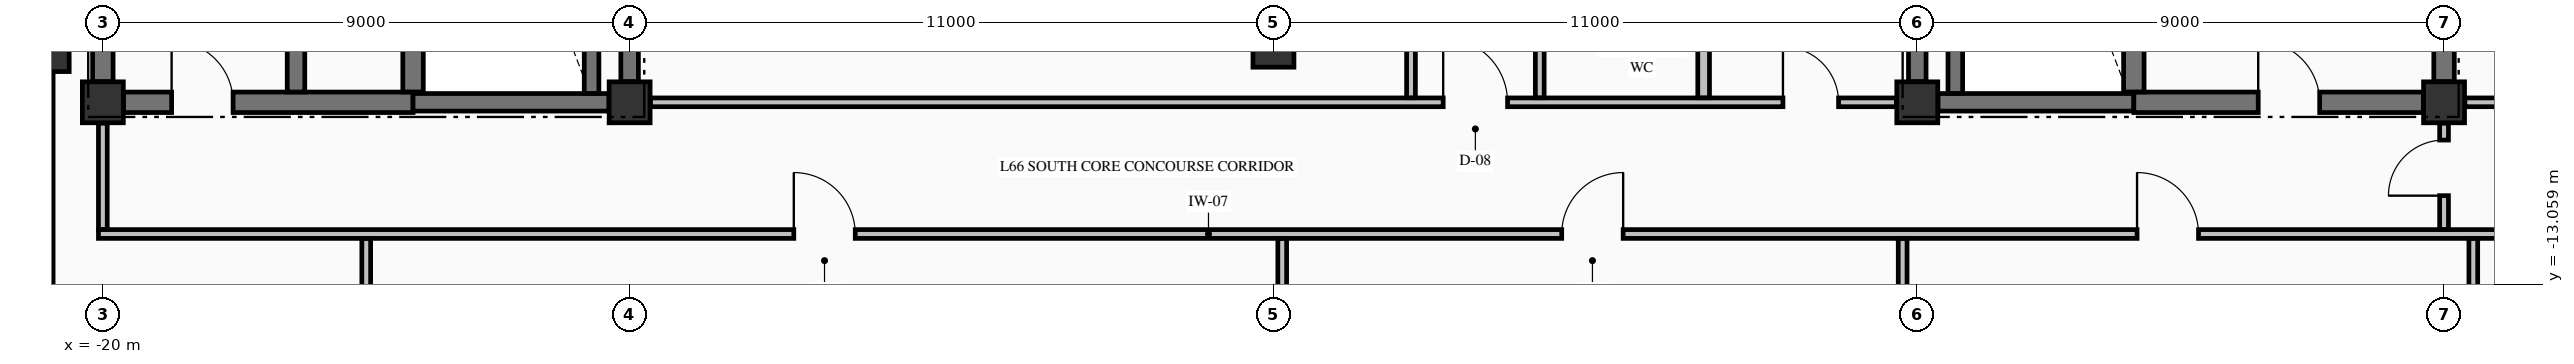
"""IFC4 building model, lengths in metres.
Left out: names, types, materials, properties, quantities, classifications, styles, units other than length and angle.
Written with IfcOpenShell. Run it as: python <this file> out.ifc"""

import sys

from ifc_helpers import new_model, si_unit, direction, frame, frame_2d, origin, origin_2d, place, context, subcontext, project, spatial, rectangle, extrude, element, fill, save


model = new_model("IFC4")
c1 = context("Model", 3, precision=1e-05, world=origin(), true_north=direction((0.0, 1.0)))
c2 = subcontext(c1, "Body", "Model", "MODEL_VIEW")
j1 = project(units=[si_unit("LENGTHUNIT", "METRE"), si_unit("PLANEANGLEUNIT", "RADIAN")], contexts=[c1])
p1 = place(None, origin())
s1 = spatial("IfcSite", under=j1, at=p1, CompositionType="ELEMENT")
p2 = place(p1, origin())
s2 = spatial("IfcBuilding", under=s1, at=p2, CompositionType="ELEMENT")
p3 = place(p2, frame((0.0, 0.0, 249.43)))
s3 = spatial("IfcBuildingStorey", under=s2, at=p3, CompositionType="ELEMENT", Elevation=249.43)
p4 = place(p3, frame((-21.0, -9.0, -0.425), z_axis=(0.0, 0.0, 1.0), x_axis=(1.0, 0.0, 0.0)))
e1 = element("IfcColumn", 1, at=p4, inside=s3, PredefinedType="COLUMN", context=c2, shape_type="SweptSolid", body=[
    extrude(rectangle(XDim=0.85, YDim=0.85, at=origin_2d()), origin(), (0.0, 0.0, 1.0), 5.0),
])
for number, where, z_axis, x_axis in (
    (2, (-20.0, -9.95, -0.425), (0.0, 0.0, 1.0), (1.0, 0.0, 0.0)),
    (3, (-11.0, -9.95, -0.425), (0.0, 0.0, 1.0), (1.0, 0.0, 0.0)),
    (4, (11.0, -9.95, -0.425), (0.0, 0.0, 1.0), (1.0, 0.0, 0.0)),
    (5, (20.0, -9.95, -0.425), (0.0, 0.0, 1.0), (1.0, 0.0, 0.0)),
    (6, (0.0, -9.0, -0.425), (0.0, 0.0, 1.0), (1.0, 0.0, 0.0)),
):
    element("IfcColumn", number, at=place(p3, frame(where, z_axis=z_axis, x_axis=x_axis)), inside=s3, PredefinedType="COLUMN", context=c2, shape_type="SweptSolid", body=[
        extrude(rectangle(XDim=0.7, YDim=0.7, at=origin_2d()), origin(), (0.0, 0.0, 1.0), 5.0),
    ])
p5 = place(p3, frame((-21.0, -9.455, 0.0), z_axis=(0.0, 0.0, 1.0), x_axis=(0.0, -1.0, 0.0)))
e7 = element("IfcWall", 7, at=p5, inside=s3, PredefinedType="STANDARD", context=c2, shape_type="SweptSolid", body=[
    extrude(rectangle(XDim=8.09, YDim=0.3, at=frame_2d((4.045, 0.0))), origin(), (0.0, 0.0, 1.0), 2.167),
])
p6 = place(p3, frame((-19.646, -9.95, 0.0), z_axis=(0.0, 0.0, 1.0), x_axis=(1.0, 0.0, 0.0)))
e8 = element("IfcWall", 8, at=p6, inside=s3, PredefinedType="SHEAR", context=c2, shape_type="SweptSolid", body=[
    extrude(rectangle(XDim=4.946, YDim=0.35, at=frame_2d((2.473, 0.0))), origin(), (0.0, 0.0, 1.0), 4.575),
])
p7 = place(p6, frame((0.821, 0.0, 0.0)))
e9 = element("IfcOpeningElement", 9, at=p7, cuts=e8, PredefinedType="OPENING", context=c2, shape_type="SweptSolid", body=[
    extrude(rectangle(XDim=1.05, YDim=2.15, at=frame_2d((0.525, 1.075))), frame((0.0, 0.185, 0.0), z_axis=(0.0, -1.0, 0.0), x_axis=(1.0, 0.0, 0.0)), (0.0, 0.0, 1.0), 0.37),
])
for number, where, z_axis, x_axis in (
    (10, (-14.7, -9.95, 0.0), (0.0, 0.0, 1.0), (1.0, 0.0, 0.0)),
    (11, (11.354, -9.95, 0.0), (0.0, 0.0, 1.0), (1.0, 0.0, 0.0)),
):
    element("IfcWall", number, at=place(p3, frame(where, z_axis=z_axis, x_axis=x_axis)), inside=s3, PredefinedType="SHEAR", context=c2, shape_type="SweptSolid", body=[
        extrude(rectangle(XDim=3.346, YDim=0.3, at=frame_2d((1.673, 0.0))), origin(), (0.0, 0.0, 1.0), 4.575),
    ])
p8 = place(p3, frame((14.7, -9.95, 0.0), z_axis=(0.0, 0.0, 1.0), x_axis=(1.0, 0.0, 0.0)))
e12 = element("IfcWall", 12, at=p8, inside=s3, PredefinedType="SHEAR", context=c2, shape_type="SweptSolid", body=[
    extrude(rectangle(XDim=4.946, YDim=0.35, at=frame_2d((2.473, 0.0))), origin(), (0.0, 0.0, 1.0), 4.575),
])
p9 = place(p8, frame((2.125, 0.0, 0.0)))
e13 = element("IfcOpeningElement", 13, at=p9, cuts=e12, PredefinedType="OPENING", context=c2, shape_type="SweptSolid", body=[
    extrude(rectangle(XDim=1.05, YDim=2.15, at=frame_2d((0.525, 1.075))), frame((0.0, 0.185, 0.0), z_axis=(0.0, -1.0, 0.0), x_axis=(1.0, 0.0, 0.0)), (0.0, 0.0, 1.0), 0.37),
])
p10 = place(p3, frame((-20.075, -12.2, 0.0), z_axis=(0.0, 0.0, 1.0), x_axis=(1.0, 0.0, 0.0)))
e14 = element("IfcWall", 14, at=p10, inside=s3, PredefinedType="PARTITIONING", context=c2, shape_type="SweptSolid", body=[
    extrude(rectangle(XDim=45.91, YDim=0.15, at=frame_2d((22.955, 0.0))), origin(), (0.0, 0.0, 1.0), 4.575),
])
p11 = place(p10, frame((11.88, 0.0, 0.0)))
e15 = element("IfcOpeningElement", 15, at=p11, cuts=e14, PredefinedType="OPENING", context=c2, shape_type="SweptSolid", body=[
    extrude(rectangle(XDim=1.05, YDim=2.15, at=frame_2d((0.525, 1.075))), frame((0.0, 0.085, 0.0), z_axis=(0.0, -1.0, 0.0), x_axis=(1.0, 0.0, 0.0)), (0.0, 0.0, 1.0), 0.17),
])
p12 = place(p10, frame((25.0, 0.0, 0.0)))
e16 = element("IfcOpeningElement", 16, at=p12, cuts=e14, PredefinedType="OPENING", context=c2, shape_type="SweptSolid", body=[
    extrude(rectangle(XDim=1.05, YDim=2.15, at=frame_2d((0.525, 1.075))), frame((0.0, 0.085, 0.0), z_axis=(0.0, -1.0, 0.0), x_axis=(1.0, 0.0, 0.0)), (0.0, 0.0, 1.0), 0.17),
])
p13 = place(p10, frame((34.83, 0.0, 0.0)))
e17 = element("IfcOpeningElement", 17, at=p13, cuts=e14, PredefinedType="OPENING", context=c2, shape_type="SweptSolid", body=[
    extrude(rectangle(XDim=1.05, YDim=2.15, at=frame_2d((0.525, 1.075))), frame((0.0, 0.085, 0.0), z_axis=(0.0, -1.0, 0.0), x_axis=(1.0, 0.0, 0.0)), (0.0, 0.0, 1.0), 0.17),
])
p14 = place(p3, frame((-10.644, -9.95, 0.0), z_axis=(0.0, 0.0, 1.0), x_axis=(1.0, 0.0, 0.0)))
e18 = element("IfcWall", 18, at=p14, inside=s3, PredefinedType="PARTITIONING", context=c2, shape_type="SweptSolid", body=[
    extrude(rectangle(XDim=21.288, YDim=0.15, at=frame_2d((10.644, 0.0))), origin(), (0.0, 0.0, 1.0), 4.575),
])
p15 = place(p14, frame((13.544, 0.0, 0.0)))
e19 = element("IfcOpeningElement", 19, at=p15, cuts=e18, PredefinedType="OPENING", context=c2, shape_type="SweptSolid", body=[
    extrude(rectangle(XDim=1.1, YDim=2.15, at=frame_2d((0.55, 1.075))), frame((0.0, 0.085, 0.0), z_axis=(0.0, -1.0, 0.0), x_axis=(1.0, 0.0, 0.0)), (0.0, 0.0, 1.0), 0.17),
])
p16 = place(p14, frame((19.349, 0.0, 0.0)))
e20 = element("IfcOpeningElement", 20, at=p16, cuts=e18, PredefinedType="OPENING", context=c2, shape_type="SweptSolid", body=[
    extrude(rectangle(XDim=0.95, YDim=2.15, at=frame_2d((0.475, 1.075))), frame((0.0, 0.085, 0.0), z_axis=(0.0, -1.0, 0.0), x_axis=(1.0, 0.0, 0.0)), (0.0, 0.0, 1.0), 0.17),
])
p17 = place(p3, frame((20.356, -9.95, 0.0), z_axis=(0.0, 0.0, 1.0), x_axis=(1.0, 0.0, 0.0)))
e21 = element("IfcWall", 21, at=p17, inside=s3, PredefinedType="PARTITIONING", context=c2, shape_type="SweptSolid", body=[
    extrude(rectangle(XDim=5.479, YDim=0.15, at=frame_2d((2.74, 0.0))), origin(), (0.0, 0.0, 1.0), 4.575),
])
p18 = place(p17, frame((2.144, 0.0, 0.0)))
e22 = element("IfcOpeningElement", 22, at=p18, cuts=e21, PredefinedType="OPENING", context=c2, shape_type="SweptSolid", body=[
    extrude(rectangle(XDim=1.0, YDim=2.15, at=frame_2d((0.5, 1.075))), frame((0.0, 0.085, 0.0), z_axis=(0.0, -1.0, 0.0), x_axis=(1.0, 0.0, 0.0)), (0.0, 0.0, 1.0), 0.17),
])
p19 = place(p3, frame((-20.0, -9.596, 0.0), z_axis=(0.0, 0.0, 1.0), x_axis=(0.0, 1.0, 0.0)))
e23 = element("IfcWall", 23, at=p19, inside=s3, PredefinedType="SHEAR", context=c2, shape_type="SweptSolid", body=[
    extrude(rectangle(XDim=9.194, YDim=0.35, at=frame_2d((4.597, 0.0))), origin(), (0.0, 0.0, 1.0), 4.575),
])
p20 = place(p3, frame((-16.7, -9.773, 0.0), z_axis=(0.0, 0.0, 1.0), x_axis=(0.0, 1.0, 0.0)))
e24 = element("IfcWall", 24, at=p20, inside=s3, PredefinedType="SHEAR", context=c2, shape_type="SweptSolid", body=[
    extrude(rectangle(XDim=9.371, YDim=0.3, at=frame_2d((4.686, 0.0))), origin(), (0.0, 0.0, 1.0), 4.575),
])
p21 = place(p3, frame((-14.7, -9.773, 0.0), z_axis=(0.0, 0.0, 1.0), x_axis=(0.0, 1.0, 0.0)))
e25 = element("IfcWall", 25, at=p21, inside=s3, PredefinedType="SHEAR", context=c2, shape_type="SweptSolid", body=[
    extrude(rectangle(XDim=9.371, YDim=0.35, at=frame_2d((4.686, 0.0))), origin(), (0.0, 0.0, 1.0), 4.575),
])
p22 = place(p3, frame((-11.65, -9.798, 0.0), z_axis=(0.0, 0.0, 1.0), x_axis=(0.0, 1.0, 0.0)))
e26 = element("IfcWall", 26, at=p22, inside=s3, PredefinedType="SOLIDWALL", context=c2, shape_type="SweptSolid", body=[
    extrude(rectangle(XDim=9.396, YDim=0.25, at=frame_2d((4.698, 0.0))), origin(), (0.0, 0.0, 1.0), 4.575),
])
for number, where, z_axis, x_axis in (
    (27, (-11.0, -9.596, 0.0), (0.0, 0.0, 1.0), (0.0, 1.0, 0.0)),
    (28, (11.0, -9.596, 0.0), (0.0, 0.0, 1.0), (0.0, 1.0, 0.0)),
):
    element("IfcWall", number, at=place(p3, frame(where, z_axis=z_axis, x_axis=x_axis)), inside=s3, PredefinedType="SHEAR", context=c2, shape_type="SweptSolid", body=[
        extrude(rectangle(XDim=9.242, YDim=0.3, at=frame_2d((4.621, 0.0))), origin(), (0.0, 0.0, 1.0), 4.575),
    ])
p23 = place(p3, frame((11.65, -9.798, 0.0), z_axis=(0.0, 0.0, 1.0), x_axis=(0.0, 1.0, 0.0)))
e29 = element("IfcWall", 29, at=p23, inside=s3, PredefinedType="SOLIDWALL", context=c2, shape_type="SweptSolid", body=[
    extrude(rectangle(XDim=9.396, YDim=0.25, at=frame_2d((4.698, 0.0))), origin(), (0.0, 0.0, 1.0), 4.575),
])
p24 = place(p3, frame((14.7, -9.773, 0.0), z_axis=(0.0, 0.0, 1.0), x_axis=(0.0, 1.0, 0.0)))
e30 = element("IfcWall", 30, at=p24, inside=s3, PredefinedType="SHEAR", context=c2, shape_type="SweptSolid", body=[
    extrude(rectangle(XDim=9.371, YDim=0.35, at=frame_2d((4.686, 0.0))), origin(), (0.0, 0.0, 1.0), 4.575),
])
p25 = place(p3, frame((20.0, -9.596, 0.0), z_axis=(0.0, 0.0, 1.0), x_axis=(0.0, 1.0, 0.0)))
e31 = element("IfcWall", 31, at=p25, inside=s3, PredefinedType="SHEAR", context=c2, shape_type="SweptSolid", body=[
    extrude(rectangle(XDim=9.242, YDim=0.35, at=frame_2d((4.621, 0.0))), origin(), (0.0, 0.0, 1.0), 4.575),
])
p26 = place(p3, frame((-20.0, -12.122, 0.0), z_axis=(0.0, 0.0, 1.0), x_axis=(0.0, 1.0, 0.0)))
e32 = element("IfcWall", 32, at=p26, inside=s3, PredefinedType="PARTITIONING", context=c2, shape_type="SweptSolid", body=[
    extrude(rectangle(XDim=1.816, YDim=0.15, at=frame_2d((0.908, 0.0))), origin(), (0.0, 0.0, 1.0), 4.165),
])
p27 = place(p3, frame((-15.5, -17.569, 0.0), z_axis=(0.0, 0.0, 1.0), x_axis=(0.0, 1.0, 0.0)))
e33 = element("IfcWall", 33, at=p27, inside=s3, PredefinedType="PARTITIONING", context=c2, shape_type="SweptSolid", body=[
    extrude(rectangle(XDim=5.291, YDim=0.15, at=frame_2d((2.646, 0.0))), origin(), (0.0, 0.0, 1.0), 4.575),
])
p28 = place(p3, frame((0.15, -23.069, 0.0), z_axis=(0.0, 0.0, 1.0), x_axis=(0.0, 1.0, 0.0)))
e34 = element("IfcWall", 34, at=p28, inside=s3, PredefinedType="PARTITIONING", context=c2, shape_type="SweptSolid", body=[
    extrude(rectangle(XDim=10.791, YDim=0.15, at=frame_2d((5.396, 0.0))), origin(), (0.0, 0.0, 1.0), 2.167),
])
p29 = place(p3, frame((2.35, -9.872, 0.0), z_axis=(0.0, 0.0, 1.0), x_axis=(0.0, 1.0, 0.0)))
e35 = element("IfcWall", 35, at=p29, inside=s3, PredefinedType="PARTITIONING", context=c2, shape_type="SweptSolid", body=[
    extrude(rectangle(XDim=9.544, YDim=0.15, at=frame_2d((4.772, 0.0))), origin(), (0.0, 0.0, 1.0), 4.575),
])
p30 = place(p3, frame((4.55, -9.872, 0.0), z_axis=(0.0, 0.0, 1.0), x_axis=(0.0, 1.0, 0.0)))
e36 = element("IfcWall", 36, at=p30, inside=s3, PredefinedType="PARTITIONING", context=c2, shape_type="SweptSolid", body=[
    extrude(rectangle(XDim=4.919, YDim=0.15, at=frame_2d((2.459, 0.0))), origin(), (0.0, 0.0, 1.0), 4.575),
])
p31 = place(p30, frame((1.997, 0.0, 0.0)))
e37 = element("IfcOpeningElement", 37, at=p31, cuts=e36, PredefinedType="OPENING", context=c2, shape_type="SweptSolid", body=[
    extrude(rectangle(XDim=0.95, YDim=2.15, at=frame_2d((0.475, 1.075))), frame((0.0, 0.085, 0.0), z_axis=(0.0, -1.0, 0.0), x_axis=(1.0, 0.0, 0.0)), (0.0, 0.0, 1.0), 0.17),
])
p32 = place(p3, frame((7.35, -9.872, 0.0), z_axis=(0.0, 0.0, 1.0), x_axis=(0.0, 1.0, 0.0)))
e38 = element("IfcWall", 38, at=p32, inside=s3, PredefinedType="PARTITIONING", context=c2, shape_type="SweptSolid", body=[
    extrude(rectangle(XDim=4.919, YDim=0.2, at=frame_2d((2.459, 0.0))), origin(), (0.0, 0.0, 1.0), 4.575),
])
p33 = place(p3, frame((10.75, -23.069, 0.0), z_axis=(0.0, 0.0, 1.0), x_axis=(0.0, 1.0, 0.0)))
e39 = element("IfcWall", 39, at=p33, inside=s3, PredefinedType="PARTITIONING", context=c2, shape_type="SweptSolid", body=[
    extrude(rectangle(XDim=10.791, YDim=0.15, at=frame_2d((5.396, 0.0))), origin(), (0.0, 0.0, 1.0), 2.167),
])
p34 = place(p3, frame((20.0, -12.122, 0.0), z_axis=(0.0, 0.0, 1.0), x_axis=(0.0, 1.0, 0.0)))
e40 = element("IfcWall", 40, at=p34, inside=s3, PredefinedType="PARTITIONING", context=c2, shape_type="SweptSolid", body=[
    extrude(rectangle(XDim=1.816, YDim=0.15, at=frame_2d((0.908, 0.0))), origin(), (0.0, 0.0, 1.0), 4.575),
])
p35 = place(p34, frame((0.577, 0.0, 0.0)))
e41 = element("IfcOpeningElement", 41, at=p35, cuts=e40, PredefinedType="OPENING", context=c2, shape_type="SweptSolid", body=[
    extrude(rectangle(XDim=0.95, YDim=2.02, at=frame_2d((0.475, 1.01))), frame((0.0, 0.085, 0.0), z_axis=(0.0, -1.0, 0.0), x_axis=(1.0, 0.0, 0.0)), (0.0, 0.0, 1.0), 0.17),
])
p36 = place(p3, frame((20.5, -17.569, 0.0), z_axis=(0.0, 0.0, 1.0), x_axis=(0.0, 1.0, 0.0)))
e42 = element("IfcWall", 42, at=p36, inside=s3, PredefinedType="PARTITIONING", context=c2, shape_type="SweptSolid", body=[
    extrude(rectangle(XDim=5.291, YDim=0.15, at=frame_2d((2.646, 0.0))), origin(), (0.0, 0.0, 1.0), 2.167),
])
p37 = place(p7, origin())
e43 = element("IfcDoor", 43, at=p37, inside=s3, OperationType="SINGLE_SWING_LEFT", PredefinedType="DOOR", context=c2, shape_type="SweptSolid", body=[
    extrude(rectangle(XDim=1.05, YDim=2.15, at=frame_2d((0.525, 1.075))), frame((0.0, 0.025, 0.0), z_axis=(0.0, -1.0, 0.0), x_axis=(1.0, 0.0, 0.0)), (0.0, 0.0, 1.0), 0.05),
])
fill(e9, e43)
p38 = place(p9, origin())
e44 = element("IfcDoor", 44, at=p38, inside=s3, OperationType="SINGLE_SWING_LEFT", PredefinedType="DOOR", context=c2, shape_type="SweptSolid", body=[
    extrude(rectangle(XDim=1.05, YDim=2.15, at=frame_2d((0.525, 1.075))), frame((0.0, 0.025, 0.0), z_axis=(0.0, -1.0, 0.0), x_axis=(1.0, 0.0, 0.0)), (0.0, 0.0, 1.0), 0.05),
])
fill(e13, e44)
p39 = place(p15, origin())
e45 = element("IfcDoor", 45, at=p39, inside=s3, OperationType="SINGLE_SWING_LEFT", PredefinedType="DOOR", context=c2, shape_type="SweptSolid", body=[
    extrude(rectangle(XDim=1.1, YDim=2.15, at=frame_2d((0.55, 1.075))), frame((0.0, 0.025, 0.0), z_axis=(0.0, -1.0, 0.0), x_axis=(1.0, 0.0, 0.0)), (0.0, 0.0, 1.0), 0.05),
])
fill(e19, e45)
p40 = place(p11, origin())
e46 = element("IfcDoor", 46, at=p40, inside=s3, OperationType="SINGLE_SWING_LEFT", PredefinedType="DOOR", context=c2, shape_type="SweptSolid", body=[
    extrude(rectangle(XDim=1.05, YDim=2.15, at=frame_2d((0.525, 1.075))), frame((0.0, 0.025, 0.0), z_axis=(0.0, -1.0, 0.0), x_axis=(1.0, 0.0, 0.0)), (0.0, 0.0, 1.0), 0.05),
])
fill(e15, e46)
p41 = place(p12, origin())
e47 = element("IfcDoor", 47, at=p41, inside=s3, OperationType="SINGLE_SWING_RIGHT", PredefinedType="DOOR", context=c2, shape_type="SweptSolid", body=[
    extrude(rectangle(XDim=1.05, YDim=2.15, at=frame_2d((0.525, 1.075))), frame((0.0, 0.025, 0.0), z_axis=(0.0, -1.0, 0.0), x_axis=(1.0, 0.0, 0.0)), (0.0, 0.0, 1.0), 0.05),
])
fill(e16, e47)
p42 = place(p13, origin())
e48 = element("IfcDoor", 48, at=p42, inside=s3, OperationType="SINGLE_SWING_LEFT", PredefinedType="DOOR", context=c2, shape_type="SweptSolid", body=[
    extrude(rectangle(XDim=1.05, YDim=2.15, at=frame_2d((0.525, 1.075))), frame((0.0, 0.025, 0.0), z_axis=(0.0, -1.0, 0.0), x_axis=(1.0, 0.0, 0.0)), (0.0, 0.0, 1.0), 0.05),
])
fill(e17, e48)
p43 = place(p16, origin())
e49 = element("IfcDoor", 49, at=p43, inside=s3, OperationType="SINGLE_SWING_LEFT", PredefinedType="DOOR", context=c2, shape_type="SweptSolid", body=[
    extrude(rectangle(XDim=0.95, YDim=2.15, at=frame_2d((0.475, 1.075))), frame((0.0, 0.025, 0.0), z_axis=(0.0, -1.0, 0.0), x_axis=(1.0, 0.0, 0.0)), (0.0, 0.0, 1.0), 0.05),
])
fill(e20, e49)
p44 = place(p35, origin())
e50 = element("IfcDoor", 50, at=p44, inside=s3, OperationType="SINGLE_SWING_LEFT", PredefinedType="DOOR", context=c2, shape_type="SweptSolid", body=[
    extrude(rectangle(XDim=0.95, YDim=2.02, at=frame_2d((0.475, 1.01))), frame((0.0, 0.025, 0.0), z_axis=(0.0, -1.0, 0.0), x_axis=(1.0, 0.0, 0.0)), (0.0, 0.0, 1.0), 0.05),
])
fill(e41, e50)
save(model, sys.argv[1])
